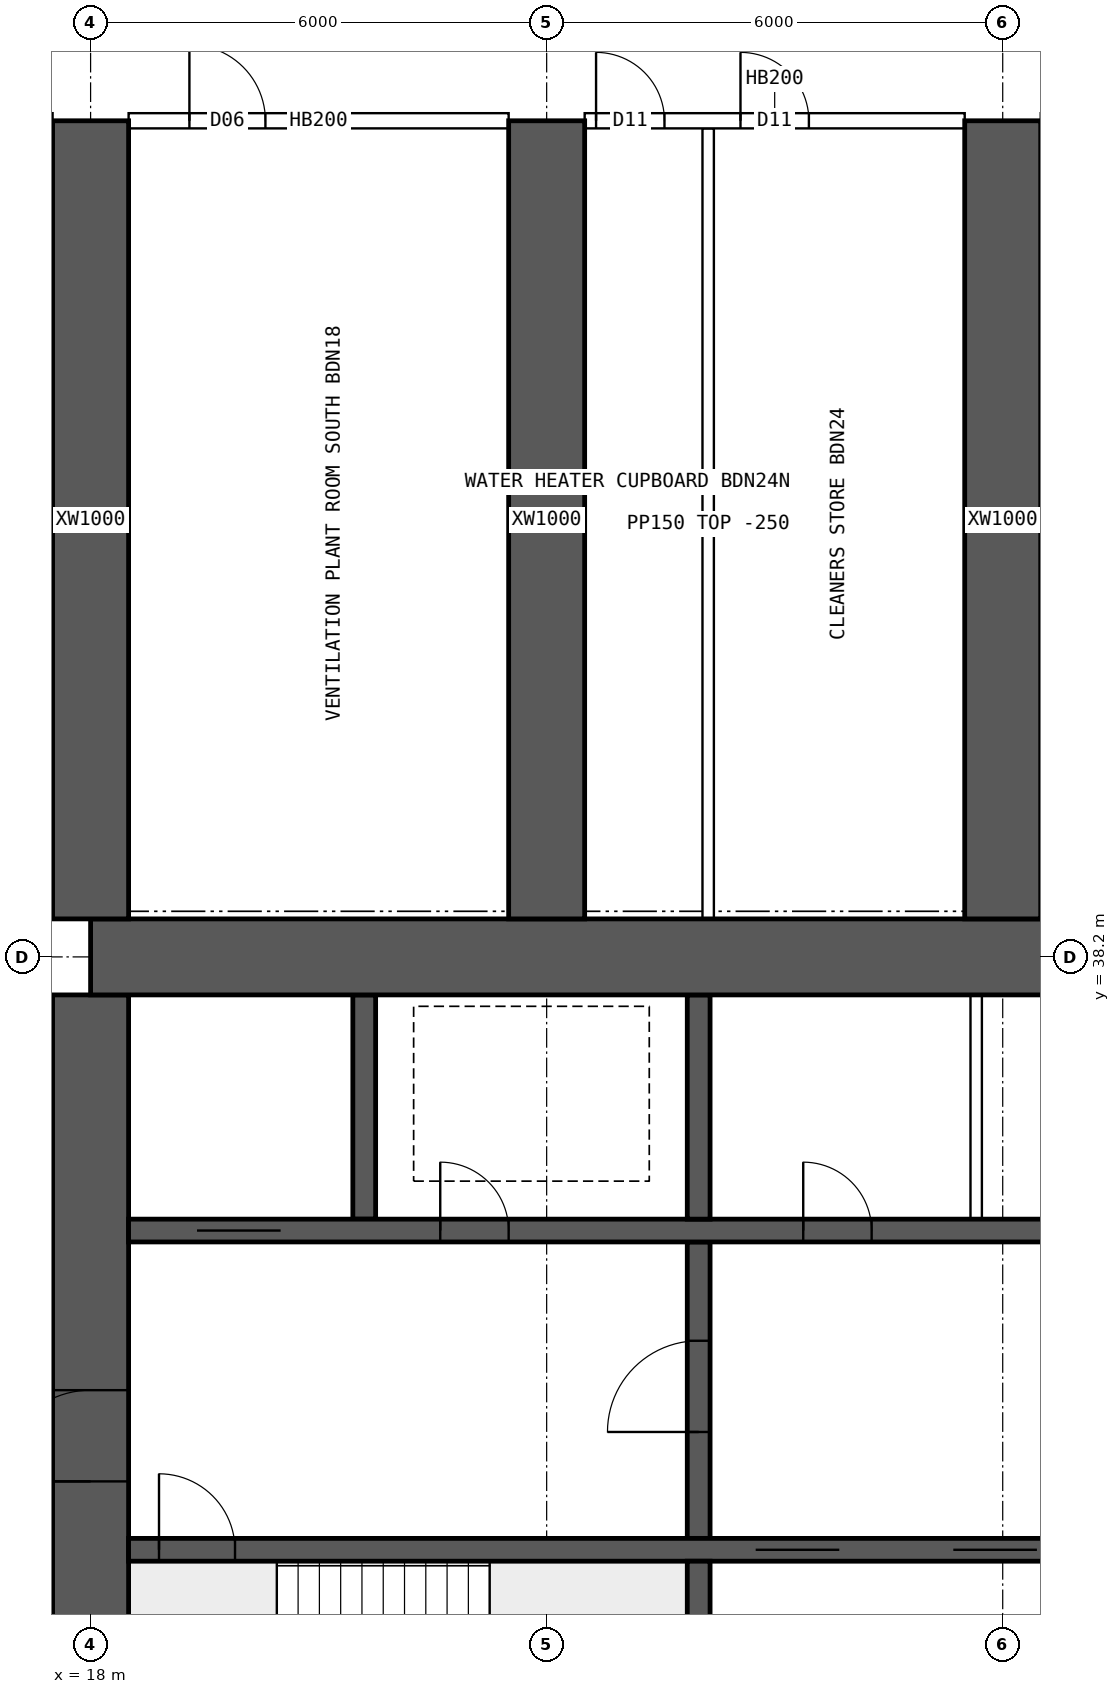
"""IFC4 building model, lengths in metres.
Left out: names, types, materials, properties, quantities, classifications, styles, units other than length and angle.
Written with IfcOpenShell. Run it as: python <this file> out.ifc"""

import sys

from ifc_helpers import new_model, si_unit, direction, frame, frame_2d, origin, place, context, subcontext, project, spatial, rectangle, extrude, element, fill, save


model = new_model("IFC4")
c1 = context("Model", 3, precision=1e-05, world=origin(), true_north=direction((0.0, 1.0)))
c2 = subcontext(c1, "Body", "Model", "MODEL_VIEW")
j1 = project(units=[si_unit("LENGTHUNIT", "METRE"), si_unit("PLANEANGLEUNIT", "RADIAN")], contexts=[c1])
p1 = place(None, origin())
s1 = spatial("IfcSite", under=j1, at=p1, CompositionType="ELEMENT")
p2 = place(p1, origin())
s2 = spatial("IfcBuilding", under=s1, at=p2, CompositionType="ELEMENT")
p3 = place(p2, frame((0.0, 0.0, 27.7)))
s3 = spatial("IfcBuildingStorey", under=s2, at=p3, CompositionType="ELEMENT", Elevation=27.7)
p4 = place(p3, frame((18.0, 38.2, 0.0), z_axis=(0.0, 0.0, 1.0), x_axis=(1.0, 0.0, 0.0)))
e1 = element("IfcWall", 1, at=p4, inside=s3, PredefinedType="SHEAR", context=c2, shape_type="SweptSolid", body=[
    extrude(rectangle(XDim=48.0, YDim=1.0, at=frame_2d((24.0, 0.0))), origin(), (0.0, 0.0, 1.0), 3.75),
])
p5 = place(p3, frame((18.0, 26.3, 0.0), z_axis=(0.0, 0.0, 1.0), x_axis=(0.0, 1.0, 0.0)))
e2 = element("IfcWall", 2, at=p5, inside=s3, PredefinedType="SHEAR", context=c2, shape_type="SweptSolid", body=[
    extrude(rectangle(XDim=11.4, YDim=1.0, at=frame_2d((5.7, 0.0))), origin(), (0.0, 0.0, 1.0), 3.75),
])
p6 = place(p5, frame((5.0, 0.0, 0.0)))
e3 = element("IfcOpeningElement", 3, at=p6, cuts=e2, PredefinedType="OPENING", context=c2, shape_type="SweptSolid", body=[
    extrude(rectangle(XDim=1.2, YDim=2.1, at=frame_2d((0.6, 1.05))), frame((0.0, 0.51, 0.0), z_axis=(0.0, -1.0, 0.0), x_axis=(1.0, 0.0, 0.0)), (0.0, 0.0, 1.0), 1.02),
])
p7 = place(p3, frame((18.5, 30.4, 0.0), z_axis=(0.0, 0.0, 1.0), x_axis=(1.0, 0.0, 0.0)))
e4 = element("IfcWall", 4, at=p7, inside=s3, PredefinedType="SHEAR", context=c2, shape_type="SweptSolid", body=[
    extrude(rectangle(XDim=47.0, YDim=0.3, at=frame_2d((23.5, 0.0))), origin(), (0.0, 0.0, 1.0), 3.75),
])
p8 = place(p7, frame((0.4, 0.0, 0.0)))
e5 = element("IfcOpeningElement", 5, at=p8, cuts=e4, PredefinedType="OPENING", context=c2, shape_type="SweptSolid", body=[
    extrude(rectangle(XDim=1.0, YDim=2.1, at=frame_2d((0.5, 1.05))), frame((0.0, 0.16, 0.0), z_axis=(0.0, -1.0, 0.0), x_axis=(1.0, 0.0, 0.0)), (0.0, 0.0, 1.0), 0.32),
])
p9 = place(p7, frame((45.6, 0.0, 0.0)))
e6 = element("IfcOpeningElement", 6, at=p9, cuts=e4, PredefinedType="OPENING", context=c2, shape_type="SweptSolid", body=[
    extrude(rectangle(XDim=1.0, YDim=2.1, at=frame_2d((0.5, 1.05))), frame((0.0, 0.16, 0.0), z_axis=(0.0, -1.0, 0.0), x_axis=(1.0, 0.0, 0.0)), (0.0, 0.0, 1.0), 0.32),
])
p10 = place(p7, frame((8.25, 0.0, 0.0)))
e7 = element("IfcOpeningElement", 7, at=p10, cuts=e4, PredefinedType="OPENING", context=c2, shape_type="SweptSolid", body=[
    extrude(rectangle(XDim=1.1, YDim=2.1, at=frame_2d((0.55, 1.05))), frame((0.0, 0.16, 0.0), z_axis=(0.0, -1.0, 0.0), x_axis=(1.0, 0.0, 0.0)), (0.0, 0.0, 1.0), 0.32),
])
p11 = place(p7, frame((10.85, 0.0, 0.0)))
e8 = element("IfcOpeningElement", 8, at=p11, cuts=e4, PredefinedType="OPENING", context=c2, shape_type="SweptSolid", body=[
    extrude(rectangle(XDim=1.1, YDim=2.1, at=frame_2d((0.55, 1.05))), frame((0.0, 0.16, 0.0), z_axis=(0.0, -1.0, 0.0), x_axis=(1.0, 0.0, 0.0)), (0.0, 0.0, 1.0), 0.32),
])
p12 = place(p7, frame((13.45, 0.0, 0.0)))
e9 = element("IfcOpeningElement", 9, at=p12, cuts=e4, PredefinedType="OPENING", context=c2, shape_type="SweptSolid", body=[
    extrude(rectangle(XDim=1.1, YDim=2.1, at=frame_2d((0.55, 1.05))), frame((0.0, 0.16, 0.0), z_axis=(0.0, -1.0, 0.0), x_axis=(1.0, 0.0, 0.0)), (0.0, 0.0, 1.0), 0.32),
])
p13 = place(p7, frame((16.05, 0.0, 0.0)))
e10 = element("IfcOpeningElement", 10, at=p13, cuts=e4, PredefinedType="OPENING", context=c2, shape_type="SweptSolid", body=[
    extrude(rectangle(XDim=1.1, YDim=2.1, at=frame_2d((0.55, 1.05))), frame((0.0, 0.16, 0.0), z_axis=(0.0, -1.0, 0.0), x_axis=(1.0, 0.0, 0.0)), (0.0, 0.0, 1.0), 0.32),
])
p14 = place(p7, frame((30.117, 0.0, 0.0)))
e11 = element("IfcOpeningElement", 11, at=p14, cuts=e4, PredefinedType="OPENING", context=c2, shape_type="SweptSolid", body=[
    extrude(rectangle(XDim=1.1, YDim=2.1, at=frame_2d((0.55, 1.05))), frame((0.0, 0.16, 0.0), z_axis=(0.0, -1.0, 0.0), x_axis=(1.0, 0.0, 0.0)), (0.0, 0.0, 1.0), 0.32),
])
p15 = place(p7, frame((33.65, 0.0, 0.0)))
e12 = element("IfcOpeningElement", 12, at=p15, cuts=e4, PredefinedType="OPENING", context=c2, shape_type="SweptSolid", body=[
    extrude(rectangle(XDim=1.1, YDim=2.1, at=frame_2d((0.55, 1.05))), frame((0.0, 0.16, 0.0), z_axis=(0.0, -1.0, 0.0), x_axis=(1.0, 0.0, 0.0)), (0.0, 0.0, 1.0), 0.32),
])
p16 = place(p7, frame((37.183, 0.0, 0.0)))
e13 = element("IfcOpeningElement", 13, at=p16, cuts=e4, PredefinedType="OPENING", context=c2, shape_type="SweptSolid", body=[
    extrude(rectangle(XDim=1.1, YDim=2.1, at=frame_2d((0.55, 1.05))), frame((0.0, 0.16, 0.0), z_axis=(0.0, -1.0, 0.0), x_axis=(1.0, 0.0, 0.0)), (0.0, 0.0, 1.0), 0.32),
])
p17 = place(p3, frame((18.5, 34.6, 0.0), z_axis=(0.0, 0.0, 1.0), x_axis=(1.0, 0.0, 0.0)))
e14 = element("IfcWall", 14, at=p17, inside=s3, PredefinedType="SHEAR", context=c2, shape_type="SweptSolid", body=[
    extrude(rectangle(XDim=47.0, YDim=0.3, at=frame_2d((23.5, 0.0))), origin(), (0.0, 0.0, 1.0), 3.75),
])
p18 = place(p17, frame((0.9, 0.0, 0.0)))
e15 = element("IfcOpeningElement", 15, at=p18, cuts=e14, PredefinedType="OPENING", context=c2, shape_type="SweptSolid", body=[
    extrude(rectangle(XDim=1.1, YDim=2.1, at=frame_2d((0.55, 1.05))), frame((0.0, 0.16, 0.0), z_axis=(0.0, -1.0, 0.0), x_axis=(1.0, 0.0, 0.0)), (0.0, 0.0, 1.0), 0.32),
])
p19 = place(p17, frame((45.0, 0.0, 0.0)))
e16 = element("IfcOpeningElement", 16, at=p19, cuts=e14, PredefinedType="OPENING", context=c2, shape_type="SweptSolid", body=[
    extrude(rectangle(XDim=1.1, YDim=2.1, at=frame_2d((0.55, 1.05))), frame((0.0, 0.16, 0.0), z_axis=(0.0, -1.0, 0.0), x_axis=(1.0, 0.0, 0.0)), (0.0, 0.0, 1.0), 0.32),
])
p20 = place(p17, frame((4.1, 0.0, 0.0)))
e17 = element("IfcOpeningElement", 17, at=p20, cuts=e14, PredefinedType="OPENING", context=c2, shape_type="SweptSolid", body=[
    extrude(rectangle(XDim=0.9, YDim=2.1, at=frame_2d((0.45, 1.05))), frame((0.0, 0.16, 0.0), z_axis=(0.0, -1.0, 0.0), x_axis=(1.0, 0.0, 0.0)), (0.0, 0.0, 1.0), 0.32),
])
p21 = place(p17, frame((42.0, 0.0, 0.0)))
e18 = element("IfcOpeningElement", 18, at=p21, cuts=e14, PredefinedType="OPENING", context=c2, shape_type="SweptSolid", body=[
    extrude(rectangle(XDim=0.9, YDim=2.1, at=frame_2d((0.45, 1.05))), frame((0.0, 0.16, 0.0), z_axis=(0.0, -1.0, 0.0), x_axis=(1.0, 0.0, 0.0)), (0.0, 0.0, 1.0), 0.32),
])
p22 = place(p17, frame((8.875, 0.0, 0.0)))
e19 = element("IfcOpeningElement", 19, at=p22, cuts=e14, PredefinedType="OPENING", context=c2, shape_type="SweptSolid", body=[
    extrude(rectangle(XDim=0.9, YDim=2.1, at=frame_2d((0.45, 1.05))), frame((0.0, 0.16, 0.0), z_axis=(0.0, -1.0, 0.0), x_axis=(1.0, 0.0, 0.0)), (0.0, 0.0, 1.0), 0.32),
])
p23 = place(p17, frame((12.849, 0.0, 0.0)))
e20 = element("IfcOpeningElement", 20, at=p23, cuts=e14, PredefinedType="OPENING", context=c2, shape_type="SweptSolid", body=[
    extrude(rectangle(XDim=0.9, YDim=2.1, at=frame_2d((0.45, 1.05))), frame((0.0, 0.16, 0.0), z_axis=(0.0, -1.0, 0.0), x_axis=(1.0, 0.0, 0.0)), (0.0, 0.0, 1.0), 0.32),
])
p24 = place(p17, frame((16.496, 0.0, 0.0)))
e21 = element("IfcOpeningElement", 21, at=p24, cuts=e14, PredefinedType="OPENING", context=c2, shape_type="SweptSolid", body=[
    extrude(rectangle(XDim=0.9, YDim=2.1, at=frame_2d((0.45, 1.05))), frame((0.0, 0.16, 0.0), z_axis=(0.0, -1.0, 0.0), x_axis=(1.0, 0.0, 0.0)), (0.0, 0.0, 1.0), 0.32),
])
p25 = place(p17, frame((20.255, 0.0, 0.0)))
e22 = element("IfcOpeningElement", 22, at=p25, cuts=e14, PredefinedType="OPENING", context=c2, shape_type="SweptSolid", body=[
    extrude(rectangle(XDim=0.9, YDim=2.1, at=frame_2d((0.45, 1.05))), frame((0.0, 0.16, 0.0), z_axis=(0.0, -1.0, 0.0), x_axis=(1.0, 0.0, 0.0)), (0.0, 0.0, 1.0), 0.32),
])
p26 = place(p17, frame((24.661, 0.0, 0.0)))
e23 = element("IfcOpeningElement", 23, at=p26, cuts=e14, PredefinedType="OPENING", context=c2, shape_type="SweptSolid", body=[
    extrude(rectangle(XDim=0.9, YDim=2.1, at=frame_2d((0.45, 1.05))), frame((0.0, 0.16, 0.0), z_axis=(0.0, -1.0, 0.0), x_axis=(1.0, 0.0, 0.0)), (0.0, 0.0, 1.0), 0.32),
])
p27 = place(p17, frame((27.458, 0.0, 0.0)))
e24 = element("IfcOpeningElement", 24, at=p27, cuts=e14, PredefinedType="OPENING", context=c2, shape_type="SweptSolid", body=[
    extrude(rectangle(XDim=0.9, YDim=2.1, at=frame_2d((0.45, 1.05))), frame((0.0, 0.16, 0.0), z_axis=(0.0, -1.0, 0.0), x_axis=(1.0, 0.0, 0.0)), (0.0, 0.0, 1.0), 0.32),
])
p28 = place(p17, frame((29.425, 0.0, 0.0)))
e25 = element("IfcOpeningElement", 25, at=p28, cuts=e14, PredefinedType="OPENING", context=c2, shape_type="SweptSolid", body=[
    extrude(rectangle(XDim=0.9, YDim=2.1, at=frame_2d((0.45, 1.05))), frame((0.0, 0.16, 0.0), z_axis=(0.0, -1.0, 0.0), x_axis=(1.0, 0.0, 0.0)), (0.0, 0.0, 1.0), 0.32),
])
p29 = place(p17, frame((31.857, 0.0, 0.0)))
e26 = element("IfcOpeningElement", 26, at=p29, cuts=e14, PredefinedType="OPENING", context=c2, shape_type="SweptSolid", body=[
    extrude(rectangle(XDim=0.9, YDim=2.1, at=frame_2d((0.45, 1.05))), frame((0.0, 0.16, 0.0), z_axis=(0.0, -1.0, 0.0), x_axis=(1.0, 0.0, 0.0)), (0.0, 0.0, 1.0), 0.32),
])
p30 = place(p17, frame((34.592, 0.0, 0.0)))
e27 = element("IfcOpeningElement", 27, at=p30, cuts=e14, PredefinedType="OPENING", context=c2, shape_type="SweptSolid", body=[
    extrude(rectangle(XDim=0.9, YDim=2.1, at=frame_2d((0.45, 1.05))), frame((0.0, 0.16, 0.0), z_axis=(0.0, -1.0, 0.0), x_axis=(1.0, 0.0, 0.0)), (0.0, 0.0, 1.0), 0.32),
])
p31 = place(p17, frame((37.632, 0.0, 0.0)))
e28 = element("IfcOpeningElement", 28, at=p31, cuts=e14, PredefinedType="OPENING", context=c2, shape_type="SweptSolid", body=[
    extrude(rectangle(XDim=0.9, YDim=2.1, at=frame_2d((0.45, 1.05))), frame((0.0, 0.16, 0.0), z_axis=(0.0, -1.0, 0.0), x_axis=(1.0, 0.0, 0.0)), (0.0, 0.0, 1.0), 0.32),
])
p32 = place(p3, frame((26.0, 26.3, 0.0), z_axis=(0.0, 0.0, 1.0), x_axis=(0.0, 1.0, 0.0)))
e29 = element("IfcWall", 29, at=p32, inside=s3, PredefinedType="SHEAR", context=c2, shape_type="SweptSolid", body=[
    extrude(rectangle(XDim=3.95, YDim=0.3, at=frame_2d((1.975, 0.0))), origin(), (0.0, 0.0, 1.0), 3.75),
])
p33 = place(p3, frame((26.0, 30.55, 0.0), z_axis=(0.0, 0.0, 1.0), x_axis=(0.0, 1.0, 0.0)))
e30 = element("IfcWall", 30, at=p33, inside=s3, PredefinedType="SHEAR", context=c2, shape_type="SweptSolid", body=[
    extrude(rectangle(XDim=3.9, YDim=0.3, at=frame_2d((1.95, 0.0))), origin(), (0.0, 0.0, 1.0), 3.75),
])
p34 = place(p33, frame((1.4, 0.0, 0.0)))
e31 = element("IfcOpeningElement", 31, at=p34, cuts=e30, PredefinedType="OPENING", context=c2, shape_type="SweptSolid", body=[
    extrude(rectangle(XDim=1.2, YDim=2.1, at=frame_2d((0.6, 1.05))), frame((0.0, 0.16, 0.0), z_axis=(0.0, -1.0, 0.0), x_axis=(1.0, 0.0, 0.0)), (0.0, 0.0, 1.0), 0.32),
])
for number, where, z_axis, x_axis in (
    (32, (21.6, 34.75, 0.0), (0.0, 0.0, 1.0), (0.0, 1.0, 0.0)),
    (33, (26.0, 34.75, 0.0), (0.0, 0.0, 1.0), (0.0, 1.0, 0.0)),
):
    element("IfcWall", number, at=place(p3, frame(where, z_axis=z_axis, x_axis=x_axis)), inside=s3, PredefinedType="SHEAR", context=c2, shape_type="SweptSolid", body=[
        extrude(rectangle(XDim=2.95, YDim=0.3, at=frame_2d((1.475, 0.0))), origin(), (0.0, 0.0, 1.0), 3.75),
    ])
for number, where, z_axis, x_axis in (
    (34, (18.0, 38.7, 0.0), (0.0, 0.0, 1.0), (0.0, 1.0, 0.0)),
    (35, (24.0, 38.7, 0.0), (0.0, 0.0, 1.0), (0.0, 1.0, 0.0)),
    (36, (30.0, 38.7, 0.0), (0.0, 0.0, 1.0), (0.0, 1.0, 0.0)),
):
    element("IfcWall", number, at=place(p3, frame(where, z_axis=z_axis, x_axis=x_axis)), inside=s3, PredefinedType="SHEAR", context=c2, shape_type="SweptSolid", body=[
        extrude(rectangle(XDim=10.5, YDim=1.0, at=frame_2d((5.25, 0.0))), origin(), (0.0, 0.0, 1.0), 3.75),
    ])
p35 = place(p3, frame((29.651, 34.75, 0.0), z_axis=(0.0, 0.0, 1.0), x_axis=(0.0, 1.0, 0.0)))
e37 = element("IfcWall", 37, at=p35, inside=s3, PredefinedType="SOLIDWALL", context=c2, shape_type="SweptSolid", body=[
    extrude(rectangle(XDim=2.95, YDim=0.15, at=frame_2d((1.475, 0.0))), origin(), (0.0, 0.0, 1.0), 3.5),
])
p36 = place(p3, frame((18.5, 49.2, 0.0), z_axis=(0.0, 0.0, 1.0), x_axis=(1.0, 0.0, 0.0)))
e38 = element("IfcWall", 38, at=p36, inside=s3, PredefinedType="SOLIDWALL", context=c2, shape_type="SweptSolid", body=[
    extrude(rectangle(XDim=5.0, YDim=0.2, at=frame_2d((2.5, 0.0))), origin(), (0.0, 0.0, 1.0), 3.5),
])
p37 = place(p36, frame((0.8, 0.0, 0.0)))
e39 = element("IfcOpeningElement", 39, at=p37, cuts=e38, PredefinedType="OPENING", context=c2, shape_type="SweptSolid", body=[
    extrude(rectangle(XDim=1.0, YDim=2.1, at=frame_2d((0.5, 1.05))), frame((0.0, 0.11, 0.0), z_axis=(0.0, -1.0, 0.0), x_axis=(1.0, 0.0, 0.0)), (0.0, 0.0, 1.0), 0.22),
])
p38 = place(p3, frame((24.5, 49.2, 0.0), z_axis=(0.0, 0.0, 1.0), x_axis=(1.0, 0.0, 0.0)))
e40 = element("IfcWall", 40, at=p38, inside=s3, PredefinedType="SOLIDWALL", context=c2, shape_type="SweptSolid", body=[
    extrude(rectangle(XDim=5.0, YDim=0.2, at=frame_2d((2.5, 0.0))), origin(), (0.0, 0.0, 1.0), 3.5),
])
p39 = place(p38, frame((0.15, 0.0, 0.0)))
e41 = element("IfcOpeningElement", 41, at=p39, cuts=e40, PredefinedType="OPENING", context=c2, shape_type="SweptSolid", body=[
    extrude(rectangle(XDim=0.9, YDim=2.1, at=frame_2d((0.45, 1.05))), frame((0.0, 0.11, 0.0), z_axis=(0.0, -1.0, 0.0), x_axis=(1.0, 0.0, 0.0)), (0.0, 0.0, 1.0), 0.22),
])
p40 = place(p38, frame((2.05, 0.0, 0.0)))
e42 = element("IfcOpeningElement", 42, at=p40, cuts=e40, PredefinedType="OPENING", context=c2, shape_type="SweptSolid", body=[
    extrude(rectangle(XDim=0.9, YDim=2.1, at=frame_2d((0.45, 1.05))), frame((0.0, 0.11, 0.0), z_axis=(0.0, -1.0, 0.0), x_axis=(1.0, 0.0, 0.0)), (0.0, 0.0, 1.0), 0.22),
])
p41 = place(p3, frame((30.5, 49.2, 0.0), z_axis=(0.0, 0.0, 1.0), x_axis=(1.0, 0.0, 0.0)))
e43 = element("IfcWall", 43, at=p41, inside=s3, PredefinedType="SOLIDWALL", context=c2, shape_type="SweptSolid", body=[
    extrude(rectangle(XDim=5.0, YDim=0.2, at=frame_2d((2.5, 0.0))), origin(), (0.0, 0.0, 1.0), 3.5),
])
p42 = place(p41, frame((0.35, 0.0, 0.0)))
e44 = element("IfcOpeningElement", 44, at=p42, cuts=e43, PredefinedType="OPENING", context=c2, shape_type="SweptSolid", body=[
    extrude(rectangle(XDim=0.9, YDim=2.1, at=frame_2d((0.45, 1.05))), frame((0.0, 0.11, 0.0), z_axis=(0.0, -1.0, 0.0), x_axis=(1.0, 0.0, 0.0)), (0.0, 0.0, 1.0), 0.22),
])
p43 = place(p41, frame((3.86, 0.0, 0.0)))
e45 = element("IfcOpeningElement", 45, at=p43, cuts=e43, PredefinedType="OPENING", context=c2, shape_type="SweptSolid", body=[
    extrude(rectangle(XDim=0.9, YDim=2.1, at=frame_2d((0.45, 1.05))), frame((0.0, 0.11, 0.0), z_axis=(0.0, -1.0, 0.0), x_axis=(1.0, 0.0, 0.0)), (0.0, 0.0, 1.0), 0.22),
])
p44 = place(p3, frame((26.125, 38.7, 0.0), z_axis=(0.0, 0.0, 1.0), x_axis=(0.0, 1.0, 0.0)))
e46 = element("IfcWall", 46, at=p44, inside=s3, PredefinedType="PARTITIONING", context=c2, shape_type="SweptSolid", body=[
    extrude(rectangle(XDim=10.4, YDim=0.15, at=frame_2d((5.2, 0.0))), origin(), (0.0, 0.0, 1.0), 3.5),
])
p45 = place(p6, origin())
e47 = element("IfcDoor", 47, at=p45, inside=s3, OperationType="SINGLE_SWING_LEFT", PredefinedType="DOOR", context=c2, shape_type="SweptSolid", body=[
    extrude(rectangle(XDim=1.2, YDim=2.1, at=frame_2d((0.6, 1.05))), frame((0.0, 0.025, 0.0), z_axis=(0.0, -1.0, 0.0), x_axis=(1.0, 0.0, 0.0)), (0.0, 0.0, 1.0), 0.05),
])
fill(e3, e47)
p46 = place(p8, origin())
e48 = element("IfcDoor", 48, at=p46, inside=s3, OperationType="SINGLE_SWING_LEFT", PredefinedType="DOOR", context=c2, shape_type="SweptSolid", body=[
    extrude(rectangle(XDim=1.0, YDim=2.1, at=frame_2d((0.5, 1.05))), frame((0.0, 0.025, 0.0), z_axis=(0.0, -1.0, 0.0), x_axis=(1.0, 0.0, 0.0)), (0.0, 0.0, 1.0), 0.05),
])
fill(e5, e48)
p47 = place(p18, origin())
e49 = element("IfcDoor", 49, at=p47, inside=s3, OperationType="DOUBLE_DOOR_SLIDING", PredefinedType="DOOR", context=c2, shape_type="SweptSolid", body=[
    extrude(rectangle(XDim=1.1, YDim=2.1, at=frame_2d((0.55, 1.05))), frame((0.0, 0.025, 0.0), z_axis=(0.0, -1.0, 0.0), x_axis=(1.0, 0.0, 0.0)), (0.0, 0.0, 1.0), 0.05),
])
fill(e15, e49)
p48 = place(p20, origin())
e50 = element("IfcDoor", 50, at=p48, inside=s3, OperationType="SINGLE_SWING_LEFT", PredefinedType="DOOR", context=c2, shape_type="SweptSolid", body=[
    extrude(rectangle(XDim=0.9, YDim=2.1, at=frame_2d((0.45, 1.05))), frame((0.0, 0.025, 0.0), z_axis=(0.0, -1.0, 0.0), x_axis=(1.0, 0.0, 0.0)), (0.0, 0.0, 1.0), 0.05),
])
fill(e17, e50)
p49 = place(p34, origin())
e51 = element("IfcDoor", 51, at=p49, inside=s3, OperationType="SINGLE_SWING_LEFT", PredefinedType="DOOR", context=c2, shape_type="SweptSolid", body=[
    extrude(rectangle(XDim=1.2, YDim=2.1, at=frame_2d((0.6, 1.05))), frame((0.0, 0.025, 0.0), z_axis=(0.0, -1.0, 0.0), x_axis=(1.0, 0.0, 0.0)), (0.0, 0.0, 1.0), 0.05),
])
fill(e31, e51)
p50 = place(p22, origin())
e52 = element("IfcDoor", 52, at=p50, inside=s3, OperationType="SINGLE_SWING_LEFT", PredefinedType="DOOR", context=c2, shape_type="SweptSolid", body=[
    extrude(rectangle(XDim=0.9, YDim=2.1, at=frame_2d((0.45, 1.05))), frame((0.0, 0.025, 0.0), z_axis=(0.0, -1.0, 0.0), x_axis=(1.0, 0.0, 0.0)), (0.0, 0.0, 1.0), 0.05),
])
fill(e19, e52)
p51 = place(p10, origin())
e53 = element("IfcDoor", 53, at=p51, inside=s3, OperationType="DOUBLE_DOOR_SLIDING", PredefinedType="DOOR", context=c2, shape_type="SweptSolid", body=[
    extrude(rectangle(XDim=1.1, YDim=2.1, at=frame_2d((0.55, 1.05))), frame((0.0, 0.025, 0.0), z_axis=(0.0, -1.0, 0.0), x_axis=(1.0, 0.0, 0.0)), (0.0, 0.0, 1.0), 0.05),
])
fill(e7, e53)
p52 = place(p11, origin())
e54 = element("IfcDoor", 54, at=p52, inside=s3, OperationType="DOUBLE_DOOR_SLIDING", PredefinedType="DOOR", context=c2, shape_type="SweptSolid", body=[
    extrude(rectangle(XDim=1.1, YDim=2.1, at=frame_2d((0.55, 1.05))), frame((0.0, 0.025, 0.0), z_axis=(0.0, -1.0, 0.0), x_axis=(1.0, 0.0, 0.0)), (0.0, 0.0, 1.0), 0.05),
])
fill(e8, e54)
p53 = place(p37, origin())
e55 = element("IfcDoor", 55, at=p53, inside=s3, OperationType="SINGLE_SWING_LEFT", PredefinedType="DOOR", context=c2, shape_type="SweptSolid", body=[
    extrude(rectangle(XDim=1.0, YDim=2.1, at=frame_2d((0.5, 1.05))), frame((0.0, 0.025, 0.0), z_axis=(0.0, -1.0, 0.0), x_axis=(1.0, 0.0, 0.0)), (0.0, 0.0, 1.0), 0.05),
])
fill(e39, e55)
p54 = place(p39, origin())
e56 = element("IfcDoor", 56, at=p54, inside=s3, OperationType="SINGLE_SWING_LEFT", PredefinedType="DOOR", context=c2, shape_type="SweptSolid", body=[
    extrude(rectangle(XDim=0.9, YDim=2.1, at=frame_2d((0.45, 1.05))), frame((0.0, 0.025, 0.0), z_axis=(0.0, -1.0, 0.0), x_axis=(1.0, 0.0, 0.0)), (0.0, 0.0, 1.0), 0.05),
])
fill(e41, e56)
p55 = place(p40, origin())
e57 = element("IfcDoor", 57, at=p55, inside=s3, OperationType="SINGLE_SWING_LEFT", PredefinedType="DOOR", context=c2, shape_type="SweptSolid", body=[
    extrude(rectangle(XDim=0.9, YDim=2.1, at=frame_2d((0.45, 1.05))), frame((0.0, 0.025, 0.0), z_axis=(0.0, -1.0, 0.0), x_axis=(1.0, 0.0, 0.0)), (0.0, 0.0, 1.0), 0.05),
])
fill(e42, e57)
save(model, sys.argv[1])
